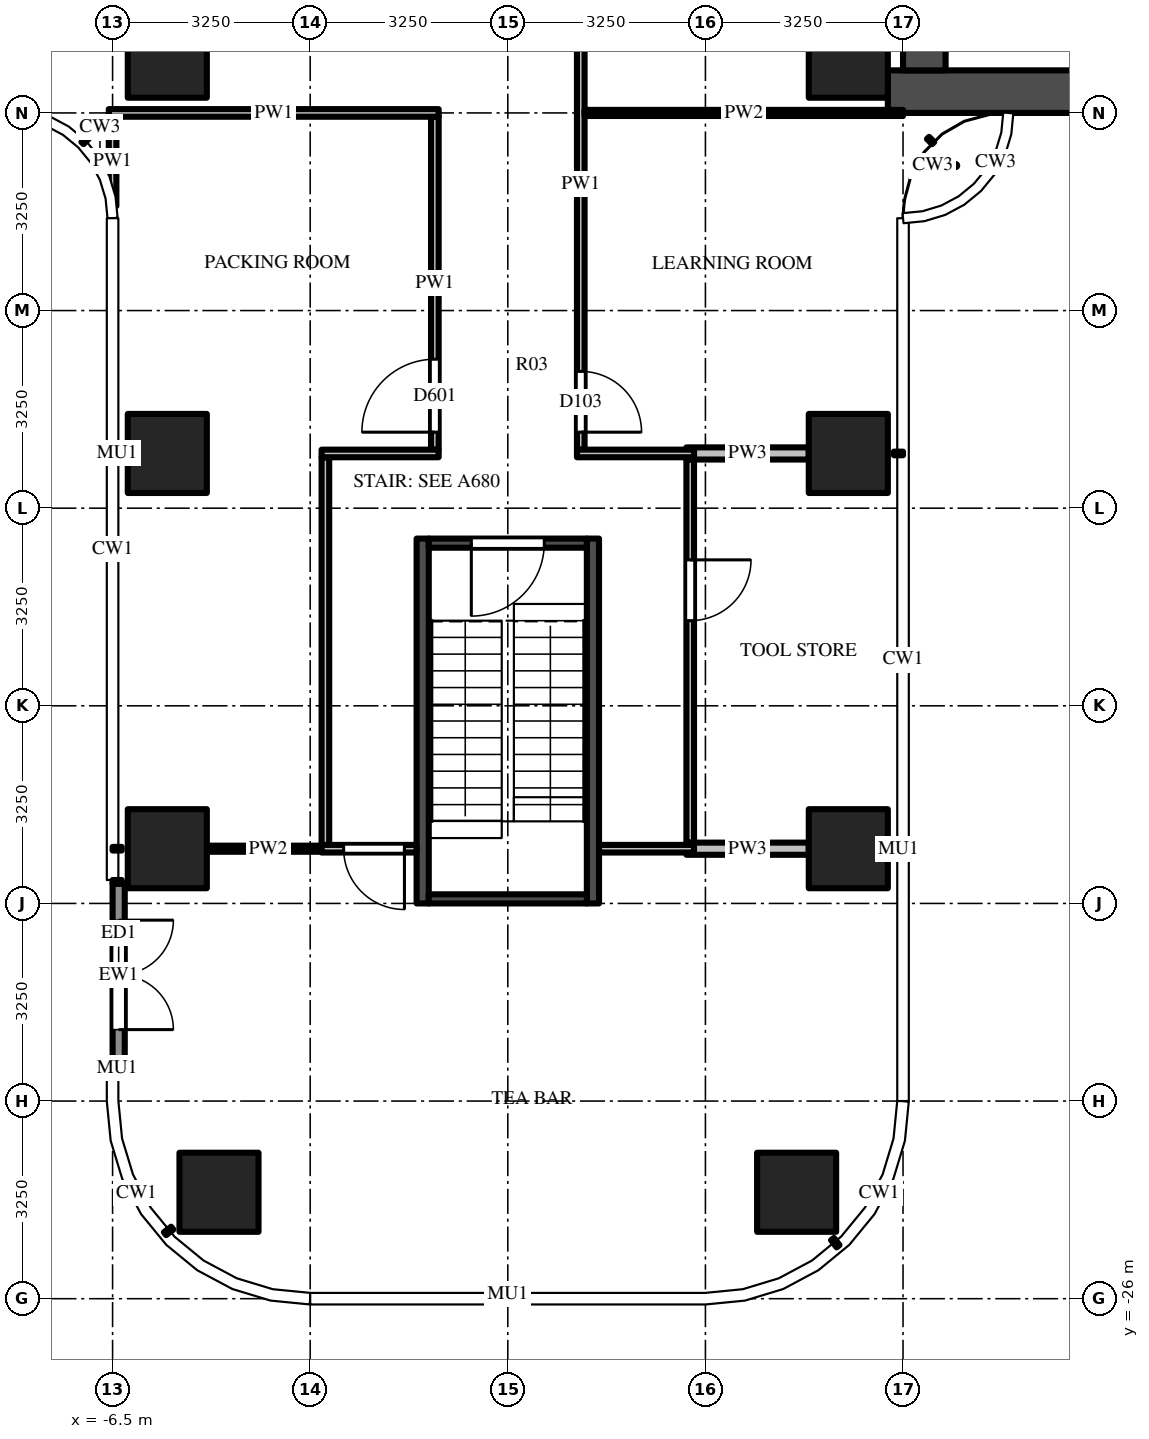
"""IFC4 building model, lengths in metres.
Left out: names, types, materials, properties, quantities, classifications, styles, units other than length and angle.
Written with IfcOpenShell. Run it as: python <this file> out.ifc"""

import sys

from ifc_helpers import new_model, si_unit, direction, frame, frame_2d, origin, origin_2d, place, context, subcontext, project, spatial, polyline, rectangle, outline, extrude, source, transform, mapped, element, fill, save


model = new_model("IFC4")
c1 = context("Model", 3, precision=1e-05, world=origin(), true_north=direction((0.0, 1.0)))
c2 = subcontext(c1, "Body", "Model", "MODEL_VIEW")
j1 = project(units=[si_unit("LENGTHUNIT", "METRE"), si_unit("PLANEANGLEUNIT", "RADIAN")], contexts=[c1])
p1 = place(None, origin())
s1 = spatial("IfcSite", under=j1, at=p1, CompositionType="ELEMENT")
p2 = place(p1, origin())
s2 = spatial("IfcBuilding", under=s1, at=p2, CompositionType="ELEMENT")
p3 = place(p2, frame((0.0, 0.0, 142.5)))
s3 = spatial("IfcBuildingStorey", under=s2, at=p3, CompositionType="ELEMENT", Elevation=142.5)
m1 = source(origin(), c2, "Body", "SweptSolid", [
    extrude(rectangle(XDim=1.3, YDim=1.3, at=origin_2d()), origin(), (0.0, 0.0, 1.0), 4.5),
])
for number, where, z_axis, x_axis in (
    (1, (5.6, -5.6, 0.0), (0.0, 0.0, 1.0), (1.0, 0.0, 0.0)),
    (2, (-5.6, -5.6, 0.0), (0.0, 0.0, 1.0), (1.0, 0.0, 0.0)),
    (3, (5.6, -12.1, 0.0), (0.0, 0.0, 1.0), (1.0, 0.0, 0.0)),
    (4, (5.6, -18.6, 0.0), (0.0, 0.0, 1.0), (1.0, 0.0, 0.0)),
    (5, (4.75, -24.25, 0.0), (0.0, 0.0, 1.0), (1.0, 0.0, 0.0)),
    (6, (-5.6, -12.1, 0.0), (0.0, 0.0, 1.0), (1.0, 0.0, 0.0)),
    (7, (-5.6, -18.6, 0.0), (0.0, 0.0, 1.0), (1.0, 0.0, 0.0)),
    (8, (-4.75, -24.25, 0.0), (0.0, 0.0, 1.0), (1.0, 0.0, 0.0)),
):
    element("IfcColumn", number, at=place(p3, frame(where, z_axis=z_axis, x_axis=x_axis)), inside=s3, PredefinedType="COLUMN", context=c2, shape_type="MappedRepresentation", body=[
        mapped(m1, transform((0.0, 0.0, 0.0))),
    ])
m2 = source(origin(), c2, "Body", "SweptSolid", [
    extrude(rectangle(XDim=16.5, YDim=0.7, at=frame_2d((8.25, 0.0))), origin(), (0.0, 0.0, 1.0), 4.25),
])
p4 = place(p3, frame((6.25, -6.15, 0.0), z_axis=(0.0, 0.0, 1.0), x_axis=(1.0, 0.0, 0.0)))
e9 = element("IfcWall", 9, at=p4, inside=s3, PredefinedType="SHEAR", context=c2, shape_type="MappedRepresentation", body=[
    mapped(m2, transform((0.0, 0.0, 0.0))),
])
m3 = source(origin(), c2, "Body", "SweptSolid", [
    extrude(rectangle(XDim=9.05, YDim=0.7, at=frame_2d((4.525, 0.0))), origin(), (0.0, 0.0, 1.0), 4.25),
])
p5 = place(p3, frame((6.85, -5.8, 0.0), z_axis=(0.0, 0.0, 1.0), x_axis=(0.0, 1.0, 0.0)))
e10 = element("IfcWall", 10, at=p5, inside=s3, PredefinedType="SHEAR", context=c2, shape_type="MappedRepresentation", body=[
    mapped(m3, transform((0.0, 0.0, 0.0))),
])
m4 = source(origin(), c2, "Body", "SweptSolid", [
    extrude(rectangle(XDim=1.8, YDim=2.1, at=frame_2d((0.9, 1.05))), frame((0.0, 0.36, 0.0), z_axis=(0.0, -1.0, 0.0), x_axis=(1.0, 0.0, 0.0)), (0.0, 0.0, 1.0), 0.72),
])
p6 = place(p5, frame((3.15, 0.0, 0.0)))
e11 = element("IfcOpeningElement", 11, at=p6, cuts=e10, PredefinedType="OPENING", context=c2, shape_type="MappedRepresentation", body=[
    mapped(m4, transform((0.0, 0.0, 0.0))),
])
m5 = source(origin(), c2, "Body", "SweptSolid", [
    extrude(rectangle(XDim=6.0, YDim=0.2, at=frame_2d((3.0, 0.0))), origin(), (0.0, 0.0, 1.0), 4.25),
])
for number, where, z_axis, x_axis in (
    (12, (1.4, -13.5, 0.0), (0.0, 0.0, 1.0), (0.0, -1.0, 0.0)),
    (13, (-1.4, -13.5, 0.0), (0.0, 0.0, 1.0), (0.0, -1.0, 0.0)),
):
    element("IfcWall", number, at=place(p3, frame(where, z_axis=z_axis, x_axis=x_axis)), inside=s3, PredefinedType="SHEAR", context=c2, shape_type="MappedRepresentation", body=[
        mapped(m5, transform((0.0, 0.0, 0.0))),
    ])
m6 = source(origin(), c2, "Body", "SweptSolid", [
    extrude(rectangle(XDim=2.6, YDim=0.15, at=frame_2d((1.3, 0.0))), origin(), (0.0, 0.0, 1.0), 4.25),
])
p7 = place(p3, frame((1.3, -13.575, 0.0), z_axis=(0.0, 0.0, 1.0), x_axis=(-1.0, 0.0, 0.0)))
e14 = element("IfcWall", 14, at=p7, inside=s3, PredefinedType="SHEAR", context=c2, shape_type="MappedRepresentation", body=[
    mapped(m6, transform((0.0, 0.0, 0.0))),
])
m7 = source(origin(), c2, "Body", "SweptSolid", [
    extrude(rectangle(XDim=1.2, YDim=2.1, at=frame_2d((0.6, 1.05))), frame((0.0, 0.085, 0.0), z_axis=(0.0, -1.0, 0.0), x_axis=(1.0, 0.0, 0.0)), (0.0, 0.0, 1.0), 0.17),
])
p8 = place(p7, frame((0.7, 0.0, 0.0)))
e15 = element("IfcOpeningElement", 15, at=p8, cuts=e14, PredefinedType="OPENING", context=c2, shape_type="MappedRepresentation", body=[
    mapped(m7, transform((0.0, 0.0, 0.0))),
])
p9 = place(p3, frame((1.3, -19.425, 0.0), z_axis=(0.0, 0.0, 1.0), x_axis=(-1.0, 0.0, 0.0)))
e16 = element("IfcWall", 16, at=p9, inside=s3, PredefinedType="SHEAR", context=c2, shape_type="MappedRepresentation", body=[
    mapped(m6, transform((0.0, 0.0, 0.0))),
])
m8 = source(origin(), c2, "Body", "SweptSolid", [
    extrude(rectangle(XDim=3.0, YDim=0.2, at=frame_2d((1.5, 0.0))), origin(), (0.0, 0.0, 1.0), 4.25),
])
p10 = place(p3, frame((-6.4, -19.175, 0.0), z_axis=(0.0, 0.0, 1.0), x_axis=(0.0, -1.0, 0.0)))
e17 = element("IfcWall", 17, at=p10, inside=s3, PredefinedType="SOLIDWALL", context=c2, shape_type="MappedRepresentation", body=[
    mapped(m8, transform((0.0, 0.0, 0.0))),
])
m9 = source(origin(), c2, "Body", "SweptSolid", [
    extrude(rectangle(XDim=1.8, YDim=2.4, at=frame_2d((0.9, 1.2))), frame((0.0, 0.11, 0.0), z_axis=(0.0, -1.0, 0.0), x_axis=(1.0, 0.0, 0.0)), (0.0, 0.0, 1.0), 0.22),
])
p11 = place(p10, frame((0.6, 0.0, 0.0)))
e18 = element("IfcOpeningElement", 18, at=p11, cuts=e17, PredefinedType="OPENING", context=c2, shape_type="MappedRepresentation", body=[
    mapped(m9, transform((0.0, 0.0, 0.0))),
])
p12 = place(p3, origin())
e19 = element("IfcWall", 19, at=p12, inside=s3, PredefinedType="USERDEFINED", context=c2, shape_type="SweptSolid", body=[
    extrude(outline(polyline([(7.304, -26.59), (6.624, -26.993), (6.318, -26.477), (6.889, -26.138), (7.742, -24.946), (7.947, -24.024), (8.532, -24.154), (8.301, -25.195), (7.304, -26.59)])), origin(), (0.0, 0.0, 1.0), 0.5),
])
m10 = source(origin(), c2, "Body", "SweptSolid", [
    extrude(rectangle(XDim=1.469, YDim=0.125, at=frame_2d((0.734, 0.0))), origin(), (0.0, 0.0, 1.0), 4.25),
])
p13 = place(p3, frame((-6.5, -6.562, 0.0), z_axis=(0.0, 0.0, 1.0), x_axis=(0.0, -1.0, 0.0)))
e20 = element("IfcWall", 20, at=p13, inside=s3, PredefinedType="PARTITIONING", context=c2, shape_type="MappedRepresentation", body=[
    mapped(m10, transform((0.0, 0.0, 0.0))),
])
m11 = source(origin(), c2, "Body", "SweptSolid", [
    extrude(rectangle(XDim=6.387, YDim=0.125, at=frame_2d((3.194, 0.0))), origin(), (0.0, 0.0, 1.0), 3.468),
])
p14 = place(p3, frame((-3.0, -18.55, 0.0), z_axis=(0.0, 0.0, 1.0), x_axis=(0.0, 1.0, 0.0)))
e21 = element("IfcWall", 21, at=p14, inside=s3, PredefinedType="PARTITIONING", context=c2, shape_type="MappedRepresentation", body=[
    mapped(m11, transform((0.0, 0.0, 0.0))),
])
m12 = source(origin(), c2, "Body", "SweptSolid", [
    extrude(rectangle(XDim=5.475, YDim=0.125, at=frame_2d((2.738, 0.0))), origin(), (0.0, 0.0, 1.0), 3.468),
])
p15 = place(p3, frame((-1.2, -12.038, 0.0), z_axis=(0.0, 0.0, 1.0), x_axis=(0.0, 1.0, 0.0)))
e22 = element("IfcWall", 22, at=p15, inside=s3, PredefinedType="PARTITIONING", context=c2, shape_type="MappedRepresentation", body=[
    mapped(m12, transform((0.0, 0.0, 0.0))),
])
m13 = source(origin(), c2, "Body", "SweptSolid", [
    extrude(rectangle(XDim=1.2, YDim=2.1, at=frame_2d((0.6, 1.05))), frame((0.0, 0.073, 0.0), z_axis=(0.0, -1.0, 0.0), x_axis=(1.0, 0.0, 0.0)), (0.0, 0.0, 1.0), 0.145),
])
p16 = place(p15, frame((0.288, 0.0, 0.0)))
e23 = element("IfcOpeningElement", 23, at=p16, cuts=e22, PredefinedType="OPENING", context=c2, shape_type="MappedRepresentation", body=[
    mapped(m13, transform((0.0, 0.0, 0.0))),
])
m14 = source(origin(), c2, "Body", "SweptSolid", [
    extrude(rectangle(XDim=8.725, YDim=0.125, at=frame_2d((4.363, 0.0))), origin(), (0.0, 0.0, 1.0), 3.468),
])
p17 = place(p3, frame((1.2, -3.312, 0.0), z_axis=(0.0, 0.0, 1.0), x_axis=(0.0, -1.0, 0.0)))
e24 = element("IfcWall", 24, at=p17, inside=s3, PredefinedType="PARTITIONING", context=c2, shape_type="MappedRepresentation", body=[
    mapped(m14, transform((0.0, 0.0, 0.0))),
])
m15 = source(origin(), c2, "Body", "SweptSolid", [
    extrude(rectangle(XDim=1.0, YDim=2.1, at=frame_2d((0.5, 1.05))), frame((0.0, 0.073, 0.0), z_axis=(0.0, -1.0, 0.0), x_axis=(1.0, 0.0, 0.0)), (0.0, 0.0, 1.0), 0.145),
])
p18 = place(p17, frame((7.438, 0.0, 0.0)))
e25 = element("IfcOpeningElement", 25, at=p18, cuts=e24, PredefinedType="OPENING", context=c2, shape_type="MappedRepresentation", body=[
    mapped(m15, transform((0.0, 0.0, 0.0))),
])
m16 = source(origin(), c2, "Body", "SweptSolid", [
    extrude(rectangle(XDim=6.3, YDim=0.125, at=frame_2d((3.15, 0.0))), origin(), (0.0, 0.0, 1.0), 3.468),
])
p19 = place(p3, frame((3.0, -12.2, 0.0), z_axis=(0.0, 0.0, 1.0), x_axis=(0.0, -1.0, 0.0)))
e26 = element("IfcWall", 26, at=p19, inside=s3, PredefinedType="PARTITIONING", context=c2, shape_type="MappedRepresentation", body=[
    mapped(m16, transform((0.0, 0.0, 0.0))),
])
p20 = place(p19, frame((1.65, 0.0, 0.0)))
e27 = element("IfcOpeningElement", 27, at=p20, cuts=e26, PredefinedType="OPENING", context=c2, shape_type="MappedRepresentation", body=[
    mapped(m15, transform((0.0, 0.0, 0.0))),
])
m17 = source(origin(), c2, "Body", "SweptSolid", [
    extrude(rectangle(XDim=2.012, YDim=0.2, at=frame_2d((1.006, 0.0))), origin(), (0.0, 0.0, 1.0), 3.697),
])
p21 = place(p3, frame((2.938, -18.6, 0.0), z_axis=(0.0, 0.0, 1.0), x_axis=(1.0, 0.0, 0.0)))
e28 = element("IfcWall", 28, at=p21, inside=s3, PredefinedType="PARTITIONING", context=c2, shape_type="MappedRepresentation", body=[
    mapped(m17, transform((0.0, 0.0, 0.0))),
])
m18 = source(origin(), c2, "Body", "SweptSolid", [
    extrude(rectangle(XDim=2.012, YDim=0.1, at=frame_2d((1.006, 0.0))), origin(), (0.0, 0.0, 1.0), 3.697),
])
p22 = place(p3, frame((-4.95, -18.6, 0.0), z_axis=(0.0, 0.0, 1.0), x_axis=(1.0, 0.0, 0.0)))
e29 = element("IfcWall", 29, at=p22, inside=s3, PredefinedType="PARTITIONING", context=c2, shape_type="MappedRepresentation", body=[
    mapped(m18, transform((0.0, 0.0, 0.0))),
])
m19 = source(origin(), c2, "Body", "SweptSolid", [
    extrude(rectangle(XDim=1.562, YDim=0.125, at=frame_2d((0.781, 0.0))), origin(), (0.0, 0.0, 1.0), 3.697),
])
p23 = place(p3, frame((-1.5, -18.6, 0.0), z_axis=(0.0, 0.0, 1.0), x_axis=(-1.0, 0.0, 0.0)))
e30 = element("IfcWall", 30, at=p23, inside=s3, PredefinedType="PARTITIONING", context=c2, shape_type="MappedRepresentation", body=[
    mapped(m19, transform((0.0, 0.0, 0.0))),
])
p24 = place(p23, frame((0.2, 0.0, 0.0)))
e31 = element("IfcOpeningElement", 31, at=p24, cuts=e30, PredefinedType="OPENING", context=c2, shape_type="MappedRepresentation", body=[
    mapped(m15, transform((0.0, 0.0, 0.0))),
])
p25 = place(p3, frame((3.062, -18.6, 0.0), z_axis=(0.0, 0.0, 1.0), x_axis=(-1.0, 0.0, 0.0)))
e32 = element("IfcWall", 32, at=p25, inside=s3, PredefinedType="PARTITIONING", context=c2, shape_type="MappedRepresentation", body=[
    mapped(m19, transform((0.0, 0.0, 0.0))),
])
m20 = source(origin(), c2, "Body", "SweptSolid", [
    extrude(rectangle(XDim=2.012, YDim=0.2, at=frame_2d((1.006, 0.0))), origin(), (0.0, 0.0, 1.0), 3.468),
])
p26 = place(p3, frame((2.938, -12.1, 0.0), z_axis=(0.0, 0.0, 1.0), x_axis=(1.0, 0.0, 0.0)))
e33 = element("IfcWall", 33, at=p26, inside=s3, PredefinedType="PARTITIONING", context=c2, shape_type="MappedRepresentation", body=[
    mapped(m20, transform((0.0, 0.0, 0.0))),
])
m21 = source(origin(), c2, "Body", "SweptSolid", [
    extrude(rectangle(XDim=1.925, YDim=0.125, at=frame_2d((0.962, 0.0))), origin(), (0.0, 0.0, 1.0), 3.468),
])
for number, where, z_axis, x_axis in (
    (34, (-3.062, -12.1, 0.0), (0.0, 0.0, 1.0), (1.0, 0.0, 0.0)),
    (35, (1.137, -12.1, 0.0), (0.0, 0.0, 1.0), (1.0, 0.0, 0.0)),
):
    element("IfcWall", number, at=place(p3, frame(where, z_axis=z_axis, x_axis=x_axis)), inside=s3, PredefinedType="PARTITIONING", context=c2, shape_type="MappedRepresentation", body=[
        mapped(m21, transform((0.0, 0.0, 0.0))),
    ])
m22 = source(origin(), c2, "Body", "SweptSolid", [
    extrude(rectangle(XDim=5.238, YDim=0.1, at=frame_2d((2.619, 0.0))), origin(), (0.0, 0.0, 1.0), 3.33),
])
p27 = place(p3, frame((1.262, -6.5, 0.0), z_axis=(0.0, 0.0, 1.0), x_axis=(1.0, 0.0, 0.0)))
e36 = element("IfcWall", 36, at=p27, inside=s3, PredefinedType="PARTITIONING", context=c2, shape_type="MappedRepresentation", body=[
    mapped(m22, transform((0.0, 0.0, 0.0))),
])
m23 = source(origin(), c2, "Body", "SweptSolid", [
    extrude(rectangle(XDim=5.425, YDim=0.125, at=frame_2d((2.712, 0.0))), origin(), (0.0, 0.0, 1.0), 3.33),
])
p28 = place(p3, frame((-1.137, -6.5, 0.0), z_axis=(0.0, 0.0, 1.0), x_axis=(-1.0, 0.0, 0.0)))
e37 = element("IfcWall", 37, at=p28, inside=s3, PredefinedType="PARTITIONING", context=c2, shape_type="MappedRepresentation", body=[
    mapped(m23, transform((0.0, 0.0, 0.0))),
])
m24 = source(origin(), c2, "Body", "SweptSolid", [
    extrude(rectangle(XDim=1.2, YDim=2.1, at=frame_2d((0.6, 1.05))), frame((0.0, 0.025, 0.0), z_axis=(0.0, -1.0, 0.0), x_axis=(1.0, 0.0, 0.0)), (0.0, 0.0, 1.0), 0.05),
])
p29 = place(p8, origin())
e38 = element("IfcDoor", 38, at=p29, inside=s3, OperationType="SINGLE_SWING_RIGHT", PredefinedType="DOOR", context=c2, shape_type="MappedRepresentation", body=[
    mapped(m24, transform((0.0, 0.0, 0.0))),
])
fill(e15, e38)
m25 = source(origin(), c2, "Body", "SweptSolid", [
    extrude(rectangle(XDim=1.8, YDim=2.4, at=frame_2d((0.9, 1.2))), frame((0.0, 0.025, 0.0), z_axis=(0.0, -1.0, 0.0), x_axis=(1.0, 0.0, 0.0)), (0.0, 0.0, 1.0), 0.05),
])
p30 = place(p11, origin())
e39 = element("IfcDoor", 39, at=p30, inside=s3, OperationType="DOUBLE_DOOR_SINGLE_SWING", PredefinedType="DOOR", context=c2, shape_type="MappedRepresentation", body=[
    mapped(m25, transform((0.0, 0.0, 0.0))),
])
fill(e18, e39)
m26 = source(origin(), c2, "Body", "SweptSolid", [
    extrude(rectangle(XDim=1.0, YDim=2.1, at=frame_2d((0.5, 1.05))), frame((0.0, 0.025, 0.0), z_axis=(0.0, -1.0, 0.0), x_axis=(1.0, 0.0, 0.0)), (0.0, 0.0, 1.0), 0.05),
])
p31 = place(p24, origin())
e40 = element("IfcDoor", 40, at=p31, inside=s3, OperationType="SINGLE_SWING_LEFT", PredefinedType="DOOR", context=c2, shape_type="MappedRepresentation", body=[
    mapped(m26, transform((0.0, 0.0, 0.0))),
])
fill(e31, e40)
p32 = place(p20, origin())
e41 = element("IfcDoor", 41, at=p32, inside=s3, OperationType="SINGLE_SWING_LEFT", PredefinedType="DOOR", context=c2, shape_type="MappedRepresentation", body=[
    mapped(m26, transform((0.0, 0.0, 0.0))),
])
fill(e27, e41)
p33 = place(p18, origin())
e42 = element("IfcDoor", 42, at=p33, inside=s3, OperationType="SINGLE_SWING_RIGHT", PredefinedType="DOOR", context=c2, shape_type="MappedRepresentation", body=[
    mapped(m26, transform((0.0, 0.0, 0.0))),
])
fill(e25, e42)
p34 = place(p16, origin())
e43 = element("IfcDoor", 43, at=p34, inside=s3, OperationType="SINGLE_SWING_LEFT", PredefinedType="DOOR", context=c2, shape_type="MappedRepresentation", body=[
    mapped(m24, transform((0.0, 0.0, 0.0))),
])
fill(e23, e43)
save(model, sys.argv[1])
